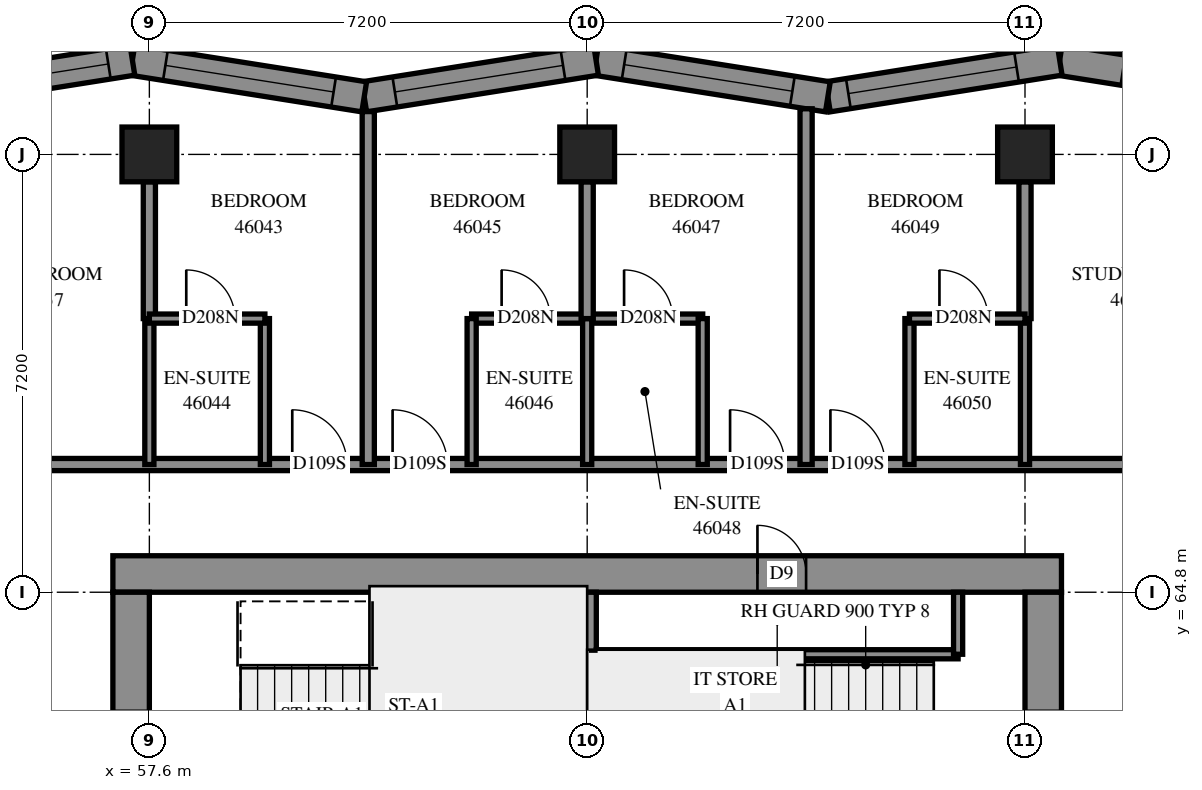
"""IFC4 building model, lengths in metres.
Left out: names, types, materials, properties, quantities, classifications, styles, units other than length and angle.
Written with IfcOpenShell. Run it as: python <this file> out.ifc"""

import sys

from ifc_helpers import new_model, si_unit, direction, frame, frame_2d, origin, origin_2d, place, context, subcontext, project, spatial, polyline, rectangle, outline, extrude, element, fill, save


model = new_model("IFC4")
c1 = context("Model", 3, precision=1e-05, world=origin(), true_north=direction((0.0, 1.0)))
c2 = subcontext(c1, "Body", "Model", "MODEL_VIEW")
j1 = project(units=[si_unit("LENGTHUNIT", "METRE"), si_unit("PLANEANGLEUNIT", "RADIAN")], contexts=[c1])
p1 = place(None, origin())
s1 = spatial("IfcSite", under=j1, at=p1, CompositionType="ELEMENT")
p2 = place(p1, origin())
s2 = spatial("IfcBuilding", under=s1, at=p2, CompositionType="ELEMENT")
p3 = place(p2, frame((0.0, 0.0, 169.4)))
s3 = spatial("IfcBuildingStorey", under=s2, at=p3, CompositionType="ELEMENT", Elevation=169.4)
for number, where, z_axis, x_axis in (
    (1, (57.6, 72.0, 0.0), (0.0, 0.0, 1.0), (1.0, 0.0, 0.0)),
    (2, (64.8, 72.0, 0.0), (0.0, 0.0, 1.0), (1.0, 0.0, 0.0)),
    (3, (72.0, 72.0, 0.0), (0.0, 0.0, 1.0), (1.0, 0.0, 0.0)),
):
    element("IfcColumn", number, at=place(p3, frame(where, z_axis=z_axis, x_axis=x_axis)), inside=s3, PredefinedType="COLUMN", context=c2, shape_type="SweptSolid", body=[
        extrude(rectangle(XDim=0.9, YDim=0.9, at=origin_2d()), origin(), (0.0, 0.0, 1.0), 3.1),
    ])
p4 = place(p3, frame((57.0, 65.1, -0.3), z_axis=(0.0, 0.0, 1.0), x_axis=(1.0, 0.0, 0.0)))
e4 = element("IfcWall", 4, at=p4, inside=s3, PredefinedType="SHEAR", context=c2, shape_type="SweptSolid", body=[
    extrude(rectangle(XDim=15.6, YDim=0.6, at=frame_2d((7.8, 0.0))), origin(), (0.0, 0.0, 1.0), 2.7),
])
p5 = place(p4, frame((10.6, 0.0, 0.3)))
e5 = element("IfcOpeningElement", 5, at=p5, cuts=e4, PredefinedType="OPENING", context=c2, shape_type="SweptSolid", body=[
    extrude(rectangle(XDim=0.8, YDim=2.1, at=frame_2d((0.4, 1.05))), frame((0.0, 0.31, 0.0), z_axis=(0.0, -1.0, 0.0), x_axis=(1.0, 0.0, 0.0)), (0.0, 0.0, 1.0), 0.62),
])
p6 = place(p3, frame((57.3, 50.4, -0.3), z_axis=(0.0, 0.0, 1.0), x_axis=(0.0, 1.0, 0.0)))
e6 = element("IfcWall", 6, at=p6, inside=s3, PredefinedType="SHEAR", context=c2, shape_type="SweptSolid", body=[
    extrude(rectangle(XDim=14.4, YDim=0.6, at=frame_2d((7.2, 0.0))), origin(), (0.0, 0.0, 1.0), 2.7),
])
p7 = place(p6, frame((4.55, 0.0, 0.3)))
e7 = element("IfcOpeningElement", 7, at=p7, cuts=e6, PredefinedType="OPENING", context=c2, shape_type="SweptSolid", body=[
    extrude(rectangle(XDim=1.1, YDim=2.1, at=frame_2d((0.55, 1.05))), frame((0.0, 0.31, 0.0), z_axis=(0.0, -1.0, 0.0), x_axis=(1.0, 0.0, 0.0)), (0.0, 0.0, 1.0), 0.62),
])
p8 = place(p6, frame((11.35, 0.0, 0.3)))
e8 = element("IfcOpeningElement", 8, at=p8, cuts=e6, PredefinedType="OPENING", context=c2, shape_type="SweptSolid", body=[
    extrude(rectangle(XDim=1.1, YDim=2.1, at=frame_2d((0.55, 1.05))), frame((0.0, 0.31, 0.0), z_axis=(0.0, -1.0, 0.0), x_axis=(1.0, 0.0, 0.0)), (0.0, 0.0, 1.0), 0.62),
])
p9 = place(p3, frame((72.3, 50.4, -0.3), z_axis=(0.0, 0.0, 1.0), x_axis=(0.0, 1.0, 0.0)))
e9 = element("IfcWall", 9, at=p9, inside=s3, PredefinedType="SHEAR", context=c2, shape_type="SweptSolid", body=[
    extrude(rectangle(XDim=14.4, YDim=0.6, at=frame_2d((7.2, 0.0))), origin(), (0.0, 0.0, 1.0), 2.7),
])
p10 = place(p9, frame((4.55, 0.0, 0.3)))
e10 = element("IfcOpeningElement", 10, at=p10, cuts=e9, PredefinedType="OPENING", context=c2, shape_type="SweptSolid", body=[
    extrude(rectangle(XDim=1.1, YDim=2.1, at=frame_2d((0.55, 1.05))), frame((0.0, 0.31, 0.0), z_axis=(0.0, -1.0, 0.0), x_axis=(1.0, 0.0, 0.0)), (0.0, 0.0, 1.0), 0.62),
])
p11 = place(p9, frame((11.35, 0.0, 0.3)))
e11 = element("IfcOpeningElement", 11, at=p11, cuts=e9, PredefinedType="OPENING", context=c2, shape_type="SweptSolid", body=[
    extrude(rectangle(XDim=1.1, YDim=2.1, at=frame_2d((0.55, 1.05))), frame((0.0, 0.31, 0.0), z_axis=(0.0, -1.0, 0.0), x_axis=(1.0, 0.0, 0.0)), (0.0, 0.0, 1.0), 0.62),
])
p12 = place(p3, frame((64.8, 60.6, 0.0), z_axis=(0.0, 0.0, 1.0), x_axis=(0.0, 1.0, 0.0)))
e12 = element("IfcWall", 12, at=p12, inside=s3, PredefinedType="SOLIDWALL", context=c2, shape_type="SweptSolid", body=[
    extrude(rectangle(XDim=4.2, YDim=0.3, at=frame_2d((2.1, 0.0))), origin(), (0.0, 0.0, 1.0), 3.1),
])
p13 = place(p3, frame((76.402, 72.944, 0.0), z_axis=(0.0, 0.0, 1.0), x_axis=(-0.9877221729, 0.1562207065, 0.0)))
e13 = element("IfcWall", 13, at=p13, inside=s3, PredefinedType="SOLIDWALL", context=c2, shape_type="SweptSolid", body=[
    extrude(outline(polyline([(0.059, -0.25), (3.919, -0.25), (3.84, 0.25), (-0.059, 0.25), (0.059, -0.25)])), origin(), (0.0, 0.0, 1.0), 3.1),
])
p14 = place(p13, frame((1.626, 0.0, 0.45)))
e14 = element("IfcOpeningElement", 14, at=p14, cuts=e13, PredefinedType="OPENING", context=c2, shape_type="SweptSolid", body=[
    extrude(rectangle(XDim=1.2, YDim=2.5, at=frame_2d((0.6, 1.25))), frame((0.0, 0.26, 0.0), z_axis=(0.0, -1.0, 0.0), x_axis=(1.0, 0.0, 0.0)), (0.0, 0.0, 1.0), 0.52),
])
p15 = place(p3, frame((72.571, 73.55, 0.0), z_axis=(0.0, 0.0, 1.0), x_axis=(-0.9877213372, -0.1562259905, 0.0)))
e15 = element("IfcWall", 15, at=p15, inside=s3, PredefinedType="SOLIDWALL", context=c2, shape_type="SweptSolid", body=[
    extrude(outline(polyline([(-0.04, -0.25), (3.82, -0.25), (3.899, 0.25), (0.04, 0.25), (-0.04, -0.25)])), origin(), (0.0, 0.0, 1.0), 3.1),
])
p16 = place(p15, frame((0.719, 0.0, 0.45)))
e16 = element("IfcOpeningElement", 16, at=p16, cuts=e15, PredefinedType="OPENING", context=c2, shape_type="SweptSolid", body=[
    extrude(rectangle(XDim=2.8, YDim=2.5, at=frame_2d((1.4, 1.25))), frame((0.0, 0.26, 0.0), z_axis=(0.0, -1.0, 0.0), x_axis=(1.0, 0.0, 0.0)), (0.0, 0.0, 1.0), 0.52),
])
p17 = place(p3, frame((68.758, 72.947, 0.0), z_axis=(0.0, 0.0, 1.0), x_axis=(-0.9877213372, 0.1562259905, 0.0)))
e17 = element("IfcWall", 17, at=p17, inside=s3, PredefinedType="SOLIDWALL", context=c2, shape_type="SweptSolid", body=[
    extrude(outline(polyline([(0.04, -0.25), (3.899, -0.25), (3.82, 0.25), (-0.04, 0.25), (0.04, -0.25)])), origin(), (0.0, 0.0, 1.0), 3.1),
])
p18 = place(p17, frame((0.592, 0.0, 0.45)))
e18 = element("IfcOpeningElement", 18, at=p18, cuts=e17, PredefinedType="OPENING", context=c2, shape_type="SweptSolid", body=[
    extrude(rectangle(XDim=2.8, YDim=2.5, at=frame_2d((1.4, 1.25))), frame((0.0, 0.26, 0.0), z_axis=(0.0, -1.0, 0.0), x_axis=(1.0, 0.0, 0.0)), (0.0, 0.0, 1.0), 0.52),
])
p19 = place(p3, frame((64.946, 73.55, 0.0), z_axis=(0.0, 0.0, 1.0), x_axis=(-0.9877213372, -0.1562259905, 0.0)))
e19 = element("IfcWall", 19, at=p19, inside=s3, PredefinedType="SOLIDWALL", context=c2, shape_type="SweptSolid", body=[
    extrude(outline(polyline([(-0.04, -0.25), (3.82, -0.25), (3.899, 0.25), (0.04, 0.25), (-0.04, -0.25)])), origin(), (0.0, 0.0, 1.0), 3.1),
])
p20 = place(p19, frame((0.55, 0.0, 0.45)))
e20 = element("IfcOpeningElement", 20, at=p20, cuts=e19, PredefinedType="OPENING", context=c2, shape_type="SweptSolid", body=[
    extrude(rectangle(XDim=2.8, YDim=2.5, at=frame_2d((1.4, 1.25))), frame((0.0, 0.26, 0.0), z_axis=(0.0, -1.0, 0.0), x_axis=(1.0, 0.0, 0.0)), (0.0, 0.0, 1.0), 0.52),
])
p21 = place(p3, frame((61.133, 72.947, 0.0), z_axis=(0.0, 0.0, 1.0), x_axis=(-0.9877213372, 0.1562259905, 0.0)))
e21 = element("IfcWall", 21, at=p21, inside=s3, PredefinedType="SOLIDWALL", context=c2, shape_type="SweptSolid", body=[
    extrude(outline(polyline([(0.04, -0.25), (3.899, -0.25), (3.82, 0.25), (-0.04, 0.25), (0.04, -0.25)])), origin(), (0.0, 0.0, 1.0), 3.1),
])
p22 = place(p21, frame((0.51, 0.0, 0.45)))
e22 = element("IfcOpeningElement", 22, at=p22, cuts=e21, PredefinedType="OPENING", context=c2, shape_type="SweptSolid", body=[
    extrude(rectangle(XDim=2.8, YDim=2.5, at=frame_2d((1.4, 1.25))), frame((0.0, 0.26, 0.0), z_axis=(0.0, -1.0, 0.0), x_axis=(1.0, 0.0, 0.0)), (0.0, 0.0, 1.0), 0.52),
])
p23 = place(p3, frame((57.321, 73.55, 0.0), z_axis=(0.0, 0.0, 1.0), x_axis=(-0.9877213372, -0.1562259905, 0.0)))
e23 = element("IfcWall", 23, at=p23, inside=s3, PredefinedType="SOLIDWALL", context=c2, shape_type="SweptSolid", body=[
    extrude(outline(polyline([(-0.04, -0.25), (3.82, -0.25), (3.899, 0.25), (0.04, 0.25), (-0.04, -0.25)])), origin(), (0.0, 0.0, 1.0), 3.1),
])
p24 = place(p23, frame((0.401, 0.0, 0.45)))
e24 = element("IfcOpeningElement", 24, at=p24, cuts=e23, PredefinedType="OPENING", context=c2, shape_type="SweptSolid", body=[
    extrude(rectangle(XDim=2.8, YDim=2.5, at=frame_2d((1.4, 1.25))), frame((0.0, 0.26, 0.0), z_axis=(0.0, -1.0, 0.0), x_axis=(1.0, 0.0, 0.0)), (0.0, 0.0, 1.0), 0.52),
])
p25 = place(p3, frame((64.95, 63.78, 0.0), z_axis=(0.0, 0.0, 1.0), x_axis=(1.0, 0.0, 0.0)))
e25 = element("IfcWall", 25, at=p25, inside=s3, PredefinedType="PARTITIONING", context=c2, shape_type="SweptSolid", body=[
    extrude(rectangle(XDim=5.95, YDim=0.15, at=frame_2d((2.975, 0.0))), origin(), (0.0, 0.0, 1.0), 3.1),
])
p26 = place(p3, frame((70.9, 63.78, 0.0), z_axis=(0.0, 0.0, 1.0), x_axis=(0.0, 1.0, 0.0)))
e26 = element("IfcWall", 26, at=p26, inside=s3, PredefinedType="PARTITIONING", context=c2, shape_type="SweptSolid", body=[
    extrude(rectangle(XDim=1.02, YDim=0.15, at=frame_2d((0.51, 0.0))), origin(), (0.0, 0.0, 1.0), 3.1),
])
p27 = place(p3, frame((55.5, 66.9, 0.0), z_axis=(0.0, 0.0, 1.0), x_axis=(1.0, 0.0, 0.0)))
e27 = element("IfcWall", 27, at=p27, inside=s3, PredefinedType="PARTITIONING", context=c2, shape_type="SweptSolid", body=[
    extrude(rectangle(XDim=18.6, YDim=0.2, at=frame_2d((9.3, 0.0))), origin(), (0.0, 0.0, 1.0), 3.1),
])
p28 = place(p27, frame((4.45, 0.0, 0.0)))
e28 = element("IfcOpeningElement", 28, at=p28, cuts=e27, PredefinedType="OPENING", context=c2, shape_type="SweptSolid", body=[
    extrude(rectangle(XDim=0.9, YDim=2.1, at=frame_2d((0.45, 1.05))), frame((0.0, 0.11, 0.0), z_axis=(0.0, -1.0, 0.0), x_axis=(1.0, 0.0, 0.0)), (0.0, 0.0, 1.0), 0.22),
])
p29 = place(p27, frame((6.1, 0.0, 0.0)))
e29 = element("IfcOpeningElement", 29, at=p29, cuts=e27, PredefinedType="OPENING", context=c2, shape_type="SweptSolid", body=[
    extrude(rectangle(XDim=0.9, YDim=2.1, at=frame_2d((0.45, 1.05))), frame((0.0, 0.11, 0.0), z_axis=(0.0, -1.0, 0.0), x_axis=(1.0, 0.0, 0.0)), (0.0, 0.0, 1.0), 0.22),
])
p30 = place(p27, frame((11.65, 0.0, 0.0)))
e30 = element("IfcOpeningElement", 30, at=p30, cuts=e27, PredefinedType="OPENING", context=c2, shape_type="SweptSolid", body=[
    extrude(rectangle(XDim=0.9, YDim=2.1, at=frame_2d((0.45, 1.05))), frame((0.0, 0.11, 0.0), z_axis=(0.0, -1.0, 0.0), x_axis=(1.0, 0.0, 0.0)), (0.0, 0.0, 1.0), 0.22),
])
p31 = place(p27, frame((13.3, 0.0, 0.0)))
e31 = element("IfcOpeningElement", 31, at=p31, cuts=e27, PredefinedType="OPENING", context=c2, shape_type="SweptSolid", body=[
    extrude(rectangle(XDim=0.9, YDim=2.1, at=frame_2d((0.45, 1.05))), frame((0.0, 0.11, 0.0), z_axis=(0.0, -1.0, 0.0), x_axis=(1.0, 0.0, 0.0)), (0.0, 0.0, 1.0), 0.22),
])
p32 = place(p3, frame((68.4, 66.9, 0.0), z_axis=(0.0, 0.0, 1.0), x_axis=(0.0, 1.0, 0.0)))
e32 = element("IfcWall", 32, at=p32, inside=s3, PredefinedType="PARTITIONING", context=c2, shape_type="SweptSolid", body=[
    extrude(rectangle(XDim=5.85, YDim=0.2, at=frame_2d((2.925, 0.0))), origin(), (0.0, 0.0, 1.0), 3.1),
])
p33 = place(p3, frame((61.2, 66.9, 0.0), z_axis=(0.0, 0.0, 1.0), x_axis=(0.0, 1.0, 0.0)))
e33 = element("IfcWall", 33, at=p33, inside=s3, PredefinedType="PARTITIONING", context=c2, shape_type="SweptSolid", body=[
    extrude(rectangle(XDim=5.804, YDim=0.2, at=frame_2d((2.902, 0.0))), origin(), (0.0, 0.0, 1.0), 3.1),
])
p34 = place(p3, frame((62.9, 69.3, 0.0), z_axis=(0.0, 0.0, 1.0), x_axis=(1.0, 0.0, 0.0)))
e34 = element("IfcWall", 34, at=p34, inside=s3, PredefinedType="PARTITIONING", context=c2, shape_type="SweptSolid", body=[
    extrude(rectangle(XDim=3.8, YDim=0.15, at=frame_2d((1.9, 0.0))), origin(), (0.0, 0.0, 1.0), 3.1),
])
p35 = place(p34, frame((0.493, 0.0, 0.0)))
e35 = element("IfcOpeningElement", 35, at=p35, cuts=e34, PredefinedType="OPENING", context=c2, shape_type="SweptSolid", body=[
    extrude(rectangle(XDim=0.8, YDim=2.1, at=frame_2d((0.4, 1.05))), frame((0.0, 0.085, 0.0), z_axis=(0.0, -1.0, 0.0), x_axis=(1.0, 0.0, 0.0)), (0.0, 0.0, 1.0), 0.17),
])
p36 = place(p34, frame((2.507, 0.0, 0.0)))
e36 = element("IfcOpeningElement", 36, at=p36, cuts=e34, PredefinedType="OPENING", context=c2, shape_type="SweptSolid", body=[
    extrude(rectangle(XDim=0.8, YDim=2.1, at=frame_2d((0.4, 1.05))), frame((0.0, 0.085, 0.0), z_axis=(0.0, -1.0, 0.0), x_axis=(1.0, 0.0, 0.0)), (0.0, 0.0, 1.0), 0.17),
])
for number, where, z_axis, x_axis in (
    (37, (57.6, 66.9, 0.0), (0.0, 0.0, 1.0), (0.0, 1.0, 0.0)),
    (38, (59.5, 66.9, 0.0), (0.0, 0.0, 1.0), (0.0, 1.0, 0.0)),
    (39, (62.9, 66.9, 0.0), (0.0, 0.0, 1.0), (0.0, 1.0, 0.0)),
    (40, (64.8, 66.9, 0.0), (0.0, 0.0, 1.0), (0.0, 1.0, 0.0)),
    (41, (66.7, 66.9, 0.0), (0.0, 0.0, 1.0), (0.0, 1.0, 0.0)),
    (42, (70.1, 66.9, 0.0), (0.0, 0.0, 1.0), (0.0, 1.0, 0.0)),
    (43, (72.0, 66.9, 0.0), (0.0, 0.0, 1.0), (0.0, 1.0, 0.0)),
):
    element("IfcWall", number, at=place(p3, frame(where, z_axis=z_axis, x_axis=x_axis)), inside=s3, PredefinedType="PARTITIONING", context=c2, shape_type="SweptSolid", body=[
        extrude(rectangle(XDim=2.4, YDim=0.15, at=frame_2d((1.2, 0.0))), origin(), (0.0, 0.0, 1.0), 3.1),
    ])
for number, where, z_axis, x_axis in (
    (44, (57.6, 69.3, 0.0), (0.0, 0.0, 1.0), (0.0, 1.0, 0.0)),
    (45, (64.8, 69.3, 0.0), (0.0, 0.0, 1.0), (0.0, 1.0, 0.0)),
    (46, (72.0, 69.3, 0.0), (0.0, 0.0, 1.0), (0.0, 1.0, 0.0)),
):
    element("IfcWall", number, at=place(p3, frame(where, z_axis=z_axis, x_axis=x_axis)), inside=s3, PredefinedType="PARTITIONING", context=c2, shape_type="SweptSolid", body=[
        extrude(rectangle(XDim=2.25, YDim=0.2, at=frame_2d((1.125, 0.0))), origin(), (0.0, 0.0, 1.0), 3.1),
    ])
p37 = place(p3, frame((70.1, 69.3, 0.0), z_axis=(0.0, 0.0, 1.0), x_axis=(1.0, 0.0, 0.0)))
e47 = element("IfcWall", 47, at=p37, inside=s3, PredefinedType="PARTITIONING", context=c2, shape_type="SweptSolid", body=[
    extrude(rectangle(XDim=1.9, YDim=0.15, at=frame_2d((0.95, 0.0))), origin(), (0.0, 0.0, 1.0), 3.1),
])
p38 = place(p37, frame((0.493, 0.0, 0.0)))
e48 = element("IfcOpeningElement", 48, at=p38, cuts=e47, PredefinedType="OPENING", context=c2, shape_type="SweptSolid", body=[
    extrude(rectangle(XDim=0.8, YDim=2.1, at=frame_2d((0.4, 1.05))), frame((0.0, 0.085, 0.0), z_axis=(0.0, -1.0, 0.0), x_axis=(1.0, 0.0, 0.0)), (0.0, 0.0, 1.0), 0.17),
])
p39 = place(p3, frame((57.6, 69.3, 0.0), z_axis=(0.0, 0.0, 1.0), x_axis=(1.0, 0.0, 0.0)))
e49 = element("IfcWall", 49, at=p39, inside=s3, PredefinedType="PARTITIONING", context=c2, shape_type="SweptSolid", body=[
    extrude(rectangle(XDim=1.9, YDim=0.15, at=frame_2d((0.95, 0.0))), origin(), (0.0, 0.0, 1.0), 3.1),
])
p40 = place(p39, frame((0.607, 0.0, 0.0)))
e50 = element("IfcOpeningElement", 50, at=p40, cuts=e49, PredefinedType="OPENING", context=c2, shape_type="SweptSolid", body=[
    extrude(rectangle(XDim=0.8, YDim=2.1, at=frame_2d((0.4, 1.05))), frame((0.0, 0.085, 0.0), z_axis=(0.0, -1.0, 0.0), x_axis=(1.0, 0.0, 0.0)), (0.0, 0.0, 1.0), 0.17),
])
p41 = place(p14, origin())
e51 = element("IfcWindow", 51, at=p41, inside=s3, PartitioningType="SINGLE_PANEL", PredefinedType="WINDOW", context=c2, shape_type="SweptSolid", body=[
    extrude(rectangle(XDim=1.2, YDim=2.5, at=frame_2d((0.6, 1.25))), frame((0.0, 0.18, 0.0), z_axis=(0.0, -1.0, 0.0), x_axis=(1.0, 0.0, 0.0)), (0.0, 0.0, 1.0), 0.06),
])
fill(e14, e51)
p42 = place(p16, origin())
e52 = element("IfcWindow", 52, at=p42, inside=s3, PartitioningType="SINGLE_PANEL", PredefinedType="WINDOW", context=c2, shape_type="SweptSolid", body=[
    extrude(rectangle(XDim=2.8, YDim=2.5, at=frame_2d((1.4, 1.25))), frame((0.0, 0.18, 0.0), z_axis=(0.0, -1.0, 0.0), x_axis=(1.0, 0.0, 0.0)), (0.0, 0.0, 1.0), 0.06),
])
fill(e16, e52)
p43 = place(p18, origin())
e53 = element("IfcWindow", 53, at=p43, inside=s3, PartitioningType="SINGLE_PANEL", PredefinedType="WINDOW", context=c2, shape_type="SweptSolid", body=[
    extrude(rectangle(XDim=2.8, YDim=2.5, at=frame_2d((1.4, 1.25))), frame((0.0, 0.18, 0.0), z_axis=(0.0, -1.0, 0.0), x_axis=(1.0, 0.0, 0.0)), (0.0, 0.0, 1.0), 0.06),
])
fill(e18, e53)
p44 = place(p20, origin())
e54 = element("IfcWindow", 54, at=p44, inside=s3, PartitioningType="SINGLE_PANEL", PredefinedType="WINDOW", context=c2, shape_type="SweptSolid", body=[
    extrude(rectangle(XDim=2.8, YDim=2.5, at=frame_2d((1.4, 1.25))), frame((0.0, 0.18, 0.0), z_axis=(0.0, -1.0, 0.0), x_axis=(1.0, 0.0, 0.0)), (0.0, 0.0, 1.0), 0.06),
])
fill(e20, e54)
p45 = place(p22, origin())
e55 = element("IfcWindow", 55, at=p45, inside=s3, PartitioningType="SINGLE_PANEL", PredefinedType="WINDOW", context=c2, shape_type="SweptSolid", body=[
    extrude(rectangle(XDim=2.8, YDim=2.5, at=frame_2d((1.4, 1.25))), frame((0.0, 0.18, 0.0), z_axis=(0.0, -1.0, 0.0), x_axis=(1.0, 0.0, 0.0)), (0.0, 0.0, 1.0), 0.06),
])
fill(e22, e55)
p46 = place(p24, origin())
e56 = element("IfcWindow", 56, at=p46, inside=s3, PartitioningType="SINGLE_PANEL", PredefinedType="WINDOW", context=c2, shape_type="SweptSolid", body=[
    extrude(rectangle(XDim=2.8, YDim=2.5, at=frame_2d((1.4, 1.25))), frame((0.0, 0.18, 0.0), z_axis=(0.0, -1.0, 0.0), x_axis=(1.0, 0.0, 0.0)), (0.0, 0.0, 1.0), 0.06),
])
fill(e24, e56)
p47 = place(p5, origin())
e57 = element("IfcDoor", 57, at=p47, inside=s3, OperationType="SINGLE_SWING_RIGHT", PredefinedType="DOOR", context=c2, shape_type="SweptSolid", body=[
    extrude(rectangle(XDim=0.8, YDim=2.1, at=frame_2d((0.4, 1.05))), frame((0.0, 0.025, 0.0), z_axis=(0.0, -1.0, 0.0), x_axis=(1.0, 0.0, 0.0)), (0.0, 0.0, 1.0), 0.05),
])
fill(e5, e57)
p48 = place(p28, origin())
e58 = element("IfcDoor", 58, at=p48, inside=s3, OperationType="SINGLE_SWING_RIGHT", PredefinedType="DOOR", context=c2, shape_type="SweptSolid", body=[
    extrude(rectangle(XDim=0.9, YDim=2.1, at=frame_2d((0.45, 1.05))), frame((0.0, 0.025, 0.0), z_axis=(0.0, -1.0, 0.0), x_axis=(1.0, 0.0, 0.0)), (0.0, 0.0, 1.0), 0.05),
])
fill(e28, e58)
p49 = place(p40, origin())
e59 = element("IfcDoor", 59, at=p49, inside=s3, OperationType="SINGLE_SWING_RIGHT", PredefinedType="DOOR", context=c2, shape_type="SweptSolid", body=[
    extrude(rectangle(XDim=0.8, YDim=2.1, at=frame_2d((0.4, 1.05))), frame((0.0, 0.025, 0.0), z_axis=(0.0, -1.0, 0.0), x_axis=(1.0, 0.0, 0.0)), (0.0, 0.0, 1.0), 0.05),
])
fill(e50, e59)
p50 = place(p29, origin())
e60 = element("IfcDoor", 60, at=p50, inside=s3, OperationType="SINGLE_SWING_LEFT", PredefinedType="DOOR", context=c2, shape_type="SweptSolid", body=[
    extrude(rectangle(XDim=0.9, YDim=2.1, at=frame_2d((0.45, 1.05))), frame((0.0, 0.025, 0.0), z_axis=(0.0, -1.0, 0.0), x_axis=(1.0, 0.0, 0.0)), (0.0, 0.0, 1.0), 0.05),
])
fill(e29, e60)
p51 = place(p35, origin())
e61 = element("IfcDoor", 61, at=p51, inside=s3, OperationType="SINGLE_SWING_RIGHT", PredefinedType="DOOR", context=c2, shape_type="SweptSolid", body=[
    extrude(rectangle(XDim=0.8, YDim=2.1, at=frame_2d((0.4, 1.05))), frame((0.0, 0.025, 0.0), z_axis=(0.0, -1.0, 0.0), x_axis=(1.0, 0.0, 0.0)), (0.0, 0.0, 1.0), 0.05),
])
fill(e35, e61)
p52 = place(p30, origin())
e62 = element("IfcDoor", 62, at=p52, inside=s3, OperationType="SINGLE_SWING_RIGHT", PredefinedType="DOOR", context=c2, shape_type="SweptSolid", body=[
    extrude(rectangle(XDim=0.9, YDim=2.1, at=frame_2d((0.45, 1.05))), frame((0.0, 0.025, 0.0), z_axis=(0.0, -1.0, 0.0), x_axis=(1.0, 0.0, 0.0)), (0.0, 0.0, 1.0), 0.05),
])
fill(e30, e62)
p53 = place(p36, origin())
e63 = element("IfcDoor", 63, at=p53, inside=s3, OperationType="SINGLE_SWING_RIGHT", PredefinedType="DOOR", context=c2, shape_type="SweptSolid", body=[
    extrude(rectangle(XDim=0.8, YDim=2.1, at=frame_2d((0.4, 1.05))), frame((0.0, 0.025, 0.0), z_axis=(0.0, -1.0, 0.0), x_axis=(1.0, 0.0, 0.0)), (0.0, 0.0, 1.0), 0.05),
])
fill(e36, e63)
p54 = place(p31, origin())
e64 = element("IfcDoor", 64, at=p54, inside=s3, OperationType="SINGLE_SWING_LEFT", PredefinedType="DOOR", context=c2, shape_type="SweptSolid", body=[
    extrude(rectangle(XDim=0.9, YDim=2.1, at=frame_2d((0.45, 1.05))), frame((0.0, 0.025, 0.0), z_axis=(0.0, -1.0, 0.0), x_axis=(1.0, 0.0, 0.0)), (0.0, 0.0, 1.0), 0.05),
])
fill(e31, e64)
p55 = place(p38, origin())
e65 = element("IfcDoor", 65, at=p55, inside=s3, OperationType="SINGLE_SWING_RIGHT", PredefinedType="DOOR", context=c2, shape_type="SweptSolid", body=[
    extrude(rectangle(XDim=0.8, YDim=2.1, at=frame_2d((0.4, 1.05))), frame((0.0, 0.025, 0.0), z_axis=(0.0, -1.0, 0.0), x_axis=(1.0, 0.0, 0.0)), (0.0, 0.0, 1.0), 0.05),
])
fill(e48, e65)
save(model, sys.argv[1])
